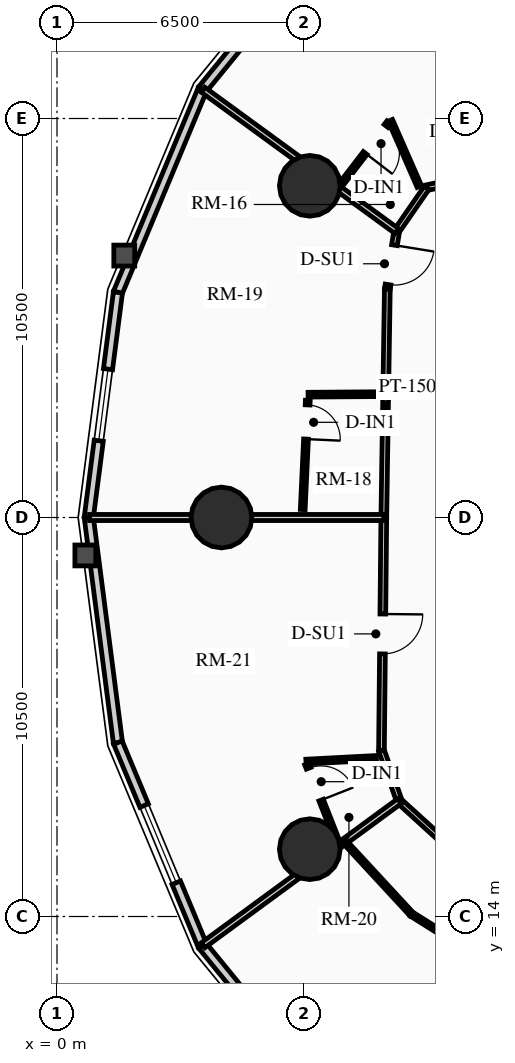
"""IFC4 building model, lengths in metres.
Left out: names, types, materials, properties, quantities, classifications, styles, units other than length and angle.
Written with IfcOpenShell. Run it as: python <this file> out.ifc"""

import sys

from ifc_helpers import new_model, si_unit, direction, frame, frame_2d, origin, origin_2d, place, context, subcontext, project, spatial, rectangle, circle, extrude, source, transform, mapped, element, fill, save


model = new_model("IFC4")
c1 = context("Model", 3, precision=1e-05, world=origin(), true_north=direction((0.0, 1.0)))
c2 = subcontext(c1, "Body", "Model", "MODEL_VIEW")
j1 = project(units=[si_unit("LENGTHUNIT", "METRE"), si_unit("PLANEANGLEUNIT", "RADIAN")], contexts=[c1])
p1 = place(None, origin())
s1 = spatial("IfcSite", under=j1, at=p1, CompositionType="ELEMENT")
p2 = place(p1, origin())
s2 = spatial("IfcBuilding", under=s1, at=p2, CompositionType="ELEMENT")
p3 = place(p2, frame((0.0, 0.0, 54.01)))
s3 = spatial("IfcBuildingStorey", under=s2, at=p3, CompositionType="ELEMENT", Elevation=54.01)
for number, where, z_axis, x_axis in (
    (1, (6.653, 33.229, 0.0), (0.0, 0.0, 1.0), (1.0, 0.0, 0.0)),
    (2, (4.328, 24.5, 0.0), (0.0, 0.0, 1.0), (1.0, 0.0, 0.0)),
    (3, (6.653, 15.771, 0.0), (0.0, 0.0, 1.0), (1.0, 0.0, 0.0)),
):
    element("IfcColumn", number, at=place(p3, frame(where, z_axis=z_axis, x_axis=x_axis)), inside=s3, PredefinedType="USERDEFINED", context=c2, shape_type="SweptSolid", body=[
        extrude(circle(Radius=0.8, at=origin_2d()), origin(), (0.0, 0.0, 1.0), 2.91),
    ])
p4 = place(p3, frame((3.828, 35.768, 0.0), z_axis=(0.0, 0.0, 1.0), x_axis=(0.632713287022, 0.77438614168, 0.0)))
e4 = element("IfcWall", 4, at=p4, inside=s3, PredefinedType="SOLIDWALL", context=c2, shape_type="SweptSolid", body=[
    extrude(rectangle(XDim=5.477, YDim=0.24, at=frame_2d((2.738, 0.0))), origin(), (0.0, 0.0, 1.0), 2.073),
])
m1 = source(origin(), c2, "Body", "SweptSolid", [
    extrude(rectangle(XDim=1.9, YDim=1.35, at=frame_2d((0.95, 0.675))), frame((0.0, 0.13, 0.0), z_axis=(0.0, -1.0, 0.0), x_axis=(1.0, 0.0, 0.0)), (0.0, 0.0, 1.0), 0.26),
])
p5 = place(p4, frame((1.788, 0.0, 0.65)))
e5 = element("IfcOpeningElement", 5, at=p5, cuts=e4, PredefinedType="OPENING", context=c2, shape_type="MappedRepresentation", body=[
    mapped(m1, transform((0.0, 0.0, 0.0), x_axis=(1.0, 0.0, 0.0), y_axis=(0.0, 1.0, 0.0), z_axis=(0.0, 0.0, 1.0), scale=1.0)),
])
p6 = place(p3, frame((1.604, 30.424, 0.0), z_axis=(0.0, 0.0, 1.0), x_axis=(0.384348836956, 0.923187939442, 0.0)))
e6 = element("IfcWall", 6, at=p6, inside=s3, PredefinedType="SOLIDWALL", context=c2, shape_type="SweptSolid", body=[
    extrude(rectangle(XDim=5.789, YDim=0.24, at=frame_2d((2.894, 0.0))), origin(), (0.0, 0.0, 1.0), 2.073),
])
p7 = place(p3, frame((0.837, 24.5, 0.0), z_axis=(0.0, 0.0, 1.0), x_axis=(0.128339641463, 0.991730274031, 0.0)))
e7 = element("IfcWall", 7, at=p7, inside=s3, PredefinedType="SOLIDWALL", context=c2, shape_type="SweptSolid", body=[
    extrude(rectangle(XDim=5.973, YDim=0.24, at=frame_2d((2.987, 0.0))), origin(), (0.0, 0.0, 1.0), 2.073),
])
p8 = place(p7, frame((2.037, 0.0, 0.65)))
e8 = element("IfcOpeningElement", 8, at=p8, cuts=e7, PredefinedType="OPENING", context=c2, shape_type="MappedRepresentation", body=[
    mapped(m1, transform((0.0, 0.0, 0.0), x_axis=(1.0, 0.0, 0.0), y_axis=(0.0, 1.0, 0.0), z_axis=(0.0, 0.0, 1.0), scale=1.0)),
])
p9 = place(p3, frame((1.604, 18.576, 0.0), z_axis=(0.0, 0.0, 1.0), x_axis=(-0.128339641463, 0.991730274031, 0.0)))
e9 = element("IfcWall", 9, at=p9, inside=s3, PredefinedType="SOLIDWALL", context=c2, shape_type="SweptSolid", body=[
    extrude(rectangle(XDim=5.973, YDim=0.24, at=frame_2d((2.987, 0.0))), origin(), (0.0, 0.0, 1.0), 2.073),
])
p10 = place(p3, frame((3.828, 13.232, 0.0), z_axis=(0.0, 0.0, 1.0), x_axis=(-0.384348836956, 0.923187939442, 0.0)))
e10 = element("IfcWall", 10, at=p10, inside=s3, PredefinedType="SOLIDWALL", context=c2, shape_type="SweptSolid", body=[
    extrude(rectangle(XDim=5.789, YDim=0.24, at=frame_2d((2.894, 0.0))), origin(), (0.0, 0.0, 1.0), 2.073),
])
m2 = source(origin(), c2, "Body", "SweptSolid", [
    extrude(rectangle(XDim=2.2, YDim=1.35, at=frame_2d((1.1, 0.675))), frame((0.0, 0.13, 0.0), z_axis=(0.0, -1.0, 0.0), x_axis=(1.0, 0.0, 0.0)), (0.0, 0.0, 1.0), 0.26),
])
p11 = place(p10, frame((1.794, 0.0, 0.65)))
e11 = element("IfcOpeningElement", 11, at=p11, cuts=e10, PredefinedType="OPENING", context=c2, shape_type="MappedRepresentation", body=[
    mapped(m2, transform((0.0, 0.0, 0.0), x_axis=(1.0, 0.0, 0.0), y_axis=(0.0, 1.0, 0.0), z_axis=(0.0, 0.0, 1.0), scale=1.0)),
])
p12 = place(p3, frame((7.293, 8.991, 0.0), z_axis=(0.0, 0.0, 1.0), x_axis=(-0.632713287022, 0.77438614168, 0.0)))
e12 = element("IfcWall", 12, at=p12, inside=s3, PredefinedType="SOLIDWALL", context=c2, shape_type="SweptSolid", body=[
    extrude(rectangle(XDim=5.477, YDim=0.24, at=frame_2d((2.738, 0.0))), origin(), (0.0, 0.0, 1.0), 2.073),
])
p13 = place(p3, frame((11.62, 33.588, 0.0), z_axis=(0.0, 0.0, 1.0), x_axis=(-0.977392314559, -0.211433827571, 0.0)))
e13 = element("IfcWall", 13, at=p13, inside=s3, PredefinedType="PARTITIONING", context=c2, shape_type="SweptSolid", body=[
    extrude(rectangle(XDim=1.934, YDim=0.15, at=frame_2d((0.967, 0.0))), origin(), (0.0, 0.0, 1.0), 2.159),
])
m3 = source(origin(), c2, "Body", "SweptSolid", [
    extrude(rectangle(XDim=1.05, YDim=2.015, at=frame_2d((0.525, 1.007))), frame((0.0, 0.085, 0.0), z_axis=(0.0, -1.0, 0.0), x_axis=(1.0, 0.0, 0.0)), (0.0, 0.0, 1.0), 0.17),
])
p14 = place(p13, frame((0.442, 0.0, 0.0)))
e14 = element("IfcOpeningElement", 14, at=p14, cuts=e13, PredefinedType="OPENING", context=c2, shape_type="MappedRepresentation", body=[
    mapped(m3, transform((0.0, 0.0, 0.0), x_axis=(1.0, 0.0, 0.0), y_axis=(0.0, 1.0, 0.0), z_axis=(0.0, 0.0, 1.0), scale=1.0)),
])
p15 = place(p3, frame((9.729, 33.179, 0.0), z_axis=(0.0, 0.0, 1.0), x_axis=(-0.569155068352, -0.822230203878, 0.0)))
e15 = element("IfcWall", 15, at=p15, inside=s3, PredefinedType="PARTITIONING", context=c2, shape_type="SweptSolid", body=[
    extrude(rectangle(XDim=1.387, YDim=0.15, at=frame_2d((0.694, 0.0))), origin(), (0.0, 0.0, 1.0), 2.159),
])
p16 = place(p3, frame((8.94, 32.038, 0.0), z_axis=(0.0, 0.0, 1.0), x_axis=(-0.159917336462, -0.987130409571, 0.0)))
e16 = element("IfcWall", 16, at=p16, inside=s3, PredefinedType="PARTITIONING", context=c2, shape_type="SweptSolid", body=[
    extrude(rectangle(XDim=1.547, YDim=0.15, at=frame_2d((0.773, 0.0))), origin(), (0.0, 0.0, 1.0), 2.205),
])
p17 = place(p16, frame((0.377, 0.0, 0.0)))
e17 = element("IfcOpeningElement", 17, at=p17, cuts=e16, PredefinedType="OPENING", context=c2, shape_type="MappedRepresentation", body=[
    mapped(m3, transform((0.0, 0.0, 0.0), x_axis=(1.0, 0.0, 0.0), y_axis=(0.0, 1.0, 0.0), z_axis=(0.0, 0.0, 1.0), scale=1.0)),
])
p18 = place(p3, frame((8.693, 30.512, 0.0), z_axis=(0.0, 0.0, 1.0), x_axis=(-0.015389665197, -0.99988157209, 0.0)))
e18 = element("IfcWall", 18, at=p18, inside=s3, PredefinedType="PARTITIONING", context=c2, shape_type="SweptSolid", body=[
    extrude(rectangle(XDim=6.012, YDim=0.15, at=frame_2d((3.006, 0.0))), origin(), (0.0, 0.0, 1.0), 2.635),
])
p19 = place(p3, frame((8.6, 24.5, 0.0), z_axis=(0.0, 0.0, 1.0), x_axis=(-0.010076760723, -0.999949228158, 0.0)))
e19 = element("IfcWall", 19, at=p19, inside=s3, PredefinedType="PARTITIONING", context=c2, shape_type="SweptSolid", body=[
    extrude(rectangle(XDim=6.13, YDim=0.15, at=frame_2d((3.065, 0.0))), origin(), (0.0, 0.0, 1.0), 2.159),
])
p20 = place(p19, frame((2.54, 0.0, 0.0)))
e20 = element("IfcOpeningElement", 20, at=p20, cuts=e19, PredefinedType="OPENING", context=c2, shape_type="MappedRepresentation", body=[
    mapped(m3, transform((0.0, 0.0, 0.0), x_axis=(1.0, 0.0, 0.0), y_axis=(0.0, 1.0, 0.0), z_axis=(0.0, 0.0, 1.0), scale=1.0)),
])
p21 = place(p3, frame((8.538, 18.371, 0.0), z_axis=(0.0, 0.0, 1.0), x_axis=(0.3330273821, -0.942917155837, 0.0)))
e21 = element("IfcWall", 21, at=p21, inside=s3, PredefinedType="PARTITIONING", context=c2, shape_type="SweptSolid", body=[
    extrude(rectangle(XDim=1.417, YDim=0.15, at=frame_2d((0.708, 0.0))), origin(), (0.0, 0.0, 1.0), 2.205),
])
p22 = place(p3, frame((9.01, 17.034, 0.0), z_axis=(0.0, 0.0, 1.0), x_axis=(0.739733009791, -0.672900493554, 0.0)))
e22 = element("IfcWall", 22, at=p22, inside=s3, PredefinedType="PARTITIONING", context=c2, shape_type="SweptSolid", body=[
    extrude(rectangle(XDim=1.494, YDim=0.15, at=frame_2d((0.747, 0.0))), origin(), (0.0, 0.0, 1.0), 2.159),
])
p23 = place(p3, frame((8.94, 32.038, 0.0), z_axis=(0.0, 0.0, 1.0), x_axis=(-0.807831293846, 0.58941377714, 0.0)))
e23 = element("IfcWall", 23, at=p23, inside=s3, PredefinedType="PARTITIONING", context=c2, shape_type="SweptSolid", body=[
    extrude(rectangle(XDim=6.308, YDim=0.16, at=frame_2d((3.154, 0.0))), origin(), (0.0, 0.0, 1.0), 2.073),
])
p24 = place(p3, frame((8.6, 24.5, 0.0), z_axis=(0.0, 0.0, 1.0), x_axis=(-1.0, 0.0, 0.0)))
e24 = element("IfcWall", 24, at=p24, inside=s3, PredefinedType="PARTITIONING", context=c2, shape_type="SweptSolid", body=[
    extrude(rectangle(XDim=7.743, YDim=0.16, at=frame_2d((3.872, 0.0))), origin(), (0.0, 0.0, 1.0), 2.073),
])
p25 = place(p3, frame((9.01, 17.034, 0.0), z_axis=(0.0, 0.0, 1.0), x_axis=(-0.806234156757, -0.591596555499, 0.0)))
e25 = element("IfcWall", 25, at=p25, inside=s3, PredefinedType="PARTITIONING", context=c2, shape_type="SweptSolid", body=[
    extrude(rectangle(XDim=6.407, YDim=0.16, at=frame_2d((3.204, 0.0))), origin(), (0.0, 0.0, 1.0), 2.073),
])
p26 = place(p3, frame((9.535, 33.211, 0.0), z_axis=(0.0, 0.0, 1.0), x_axis=(-0.401687955793, 0.915776602765, 0.0)))
e26 = element("IfcWall", 26, at=p26, inside=s3, PredefinedType="PARTITIONING", context=c2, shape_type="SweptSolid", body=[
    extrude(rectangle(XDim=1.901, YDim=0.125, at=frame_2d((0.95, 0.0))), origin(), (0.0, 0.0, 1.0), 2.635),
])
p27 = place(p3, frame((8.732, 34.899, 0.0), z_axis=(0.0, 0.0, 1.0), x_axis=(-0.609677010074, -0.792649950096, 0.0)))
e27 = element("IfcWall", 27, at=p27, inside=s3, PredefinedType="PARTITIONING", context=c2, shape_type="SweptSolid", body=[
    extrude(rectangle(XDim=2.097, YDim=0.125, at=frame_2d((1.049, 0.0))), origin(), (0.0, 0.0, 1.0), 2.073),
])
m4 = source(origin(), c2, "Body", "SweptSolid", [
    extrude(rectangle(XDim=0.9, YDim=2.005, at=frame_2d((0.45, 1.002))), frame((0.0, 0.073, 0.0), z_axis=(0.0, -1.0, 0.0), x_axis=(1.0, 0.0, 0.0)), (0.0, 0.0, 1.0), 0.145),
])
p28 = place(p27, frame((0.12, 0.0, 0.0)))
e28 = element("IfcOpeningElement", 28, at=p28, cuts=e27, PredefinedType="OPENING", context=c2, shape_type="MappedRepresentation", body=[
    mapped(m4, transform((0.0, 0.0, 0.0), x_axis=(1.0, 0.0, 0.0), y_axis=(0.0, 1.0, 0.0), z_axis=(0.0, 0.0, 1.0), scale=1.0)),
])
p29 = place(p3, frame((8.429, 27.745, 0.0), z_axis=(0.0, 0.0, 1.0), x_axis=(-0.999976632219, -0.006836301373, 0.0)))
e29 = element("IfcWall", 29, at=p29, inside=s3, PredefinedType="PARTITIONING", context=c2, shape_type="SweptSolid", body=[
    extrude(rectangle(XDim=1.821, YDim=0.125, at=frame_2d((0.911, 0.0))), origin(), (0.0, 0.0, 1.0), 2.635),
])
p30 = place(p3, frame((6.6, 27.583, 0.0), z_axis=(0.0, 0.0, 1.0), x_axis=(-0.046516553412, -0.998917519247, 0.0)))
e30 = element("IfcWall", 30, at=p30, inside=s3, PredefinedType="PARTITIONING", context=c2, shape_type="SweptSolid", body=[
    extrude(rectangle(XDim=2.876, YDim=0.125, at=frame_2d((1.438, 0.0))), origin(), (0.0, 0.0, 1.0), 2.635),
])
p31 = place(p30, frame((0.12, 0.0, 0.0)))
e31 = element("IfcOpeningElement", 31, at=p31, cuts=e30, PredefinedType="OPENING", context=c2, shape_type="MappedRepresentation", body=[
    mapped(m4, transform((0.0, 0.0, 0.0), x_axis=(1.0, 0.0, 0.0), y_axis=(0.0, 1.0, 0.0), z_axis=(0.0, 0.0, 1.0), scale=1.0)),
])
p32 = place(p3, frame((8.404, 18.173, 0.0), z_axis=(0.0, 0.0, 1.0), x_axis=(-0.998640999178, -0.052116741655, 0.0)))
e32 = element("IfcWall", 32, at=p32, inside=s3, PredefinedType="PARTITIONING", context=c2, shape_type="SweptSolid", body=[
    extrude(rectangle(XDim=1.855, YDim=0.125, at=frame_2d((0.927, 0.0))), origin(), (0.0, 0.0, 1.0), 2.205),
])
p33 = place(p3, frame((6.577, 18.012, 0.0), z_axis=(0.0, 0.0, 1.0), x_axis=(0.366179258149, -0.930544330433, 0.0)))
e33 = element("IfcWall", 33, at=p33, inside=s3, PredefinedType="PARTITIONING", context=c2, shape_type="SweptSolid", body=[
    extrude(rectangle(XDim=2.208, YDim=0.125, at=frame_2d((1.104, 0.0))), origin(), (0.0, 0.0, 1.0), 2.159),
])
p34 = place(p33, frame((0.12, 0.0, 0.0)))
e34 = element("IfcOpeningElement", 34, at=p34, cuts=e33, PredefinedType="OPENING", context=c2, shape_type="MappedRepresentation", body=[
    mapped(m4, transform((0.0, 0.0, 0.0), x_axis=(1.0, 0.0, 0.0), y_axis=(0.0, 1.0, 0.0), z_axis=(0.0, 0.0, 1.0), scale=1.0)),
])
p35 = place(p3, frame((7.564, 15.973, 0.0), z_axis=(0.0, 0.0, 1.0), x_axis=(0.678576389573, -0.734529838409, 0.0)))
e35 = element("IfcWall", 35, at=p35, inside=s3, PredefinedType="PARTITIONING", context=c2, shape_type="SweptSolid", body=[
    extrude(rectangle(XDim=2.601, YDim=0.125, at=frame_2d((1.3, 0.0))), origin(), (0.0, 0.0, 1.0), 2.635),
])
p36 = place(p3, frame((9.329, 14.063, 0.0), z_axis=(0.0, 0.0, 1.0), x_axis=(0.846882074778, -0.531780736225, 0.0)))
e36 = element("IfcWall", 36, at=p36, inside=s3, PredefinedType="PARTITIONING", context=c2, shape_type="SweptSolid", body=[
    extrude(rectangle(XDim=2.585, YDim=0.125, at=frame_2d((1.292, 0.0))), origin(), (0.0, 0.0, 1.0), 2.205),
])
m5 = source(origin(), c2, "Body", "SweptSolid", [
    extrude(rectangle(XDim=1.9, YDim=1.35, at=frame_2d((0.95, 0.675))), frame((0.0, 0.03, 0.0), z_axis=(0.0, -1.0, 0.0), x_axis=(1.0, 0.0, 0.0)), (0.0, 0.0, 1.0), 0.06),
])
p37 = place(p8, origin())
e37 = element("IfcWindow", 37, at=p37, inside=s3, PartitioningType="DOUBLE_PANEL_VERTICAL", PredefinedType="WINDOW", context=c2, shape_type="MappedRepresentation", body=[
    mapped(m5, transform((0.0, 0.0, 0.0), x_axis=(1.0, 0.0, 0.0), y_axis=(0.0, 1.0, 0.0), z_axis=(0.0, 0.0, 1.0), scale=1.0)),
])
fill(e8, e37)
m6 = source(origin(), c2, "Body", "SweptSolid", [
    extrude(rectangle(XDim=2.2, YDim=1.35, at=frame_2d((1.1, 0.675))), frame((0.0, 0.03, 0.0), z_axis=(0.0, -1.0, 0.0), x_axis=(1.0, 0.0, 0.0)), (0.0, 0.0, 1.0), 0.06),
])
p38 = place(p11, origin())
e38 = element("IfcWindow", 38, at=p38, inside=s3, PartitioningType="DOUBLE_PANEL_VERTICAL", PredefinedType="WINDOW", context=c2, shape_type="MappedRepresentation", body=[
    mapped(m6, transform((0.0, 0.0, 0.0), x_axis=(1.0, 0.0, 0.0), y_axis=(0.0, 1.0, 0.0), z_axis=(0.0, 0.0, 1.0), scale=1.0)),
])
fill(e11, e38)
m7 = source(origin(), c2, "Body", "SweptSolid", [
    extrude(rectangle(XDim=0.9, YDim=2.005, at=frame_2d((0.45, 1.002))), frame((0.0, 0.025, 0.0), z_axis=(0.0, -1.0, 0.0), x_axis=(1.0, 0.0, 0.0)), (0.0, 0.0, 1.0), 0.05),
])
p39 = place(p28, origin())
e39 = element("IfcDoor", 39, at=p39, inside=s3, OperationType="SINGLE_SWING_RIGHT", PredefinedType="DOOR", context=c2, shape_type="MappedRepresentation", body=[
    mapped(m7, transform((0.0, 0.0, 0.0), x_axis=(1.0, 0.0, 0.0), y_axis=(0.0, 1.0, 0.0), z_axis=(0.0, 0.0, 1.0), scale=1.0)),
])
fill(e28, e39)
m8 = source(origin(), c2, "Body", "SweptSolid", [
    extrude(rectangle(XDim=1.05, YDim=2.015, at=frame_2d((0.525, 1.007))), frame((0.0, 0.025, 0.0), z_axis=(0.0, -1.0, 0.0), x_axis=(1.0, 0.0, 0.0)), (0.0, 0.0, 1.0), 0.05),
])
p40 = place(p17, origin())
e40 = element("IfcDoor", 40, at=p40, inside=s3, OperationType="SINGLE_SWING_LEFT", PredefinedType="DOOR", context=c2, shape_type="MappedRepresentation", body=[
    mapped(m8, transform((0.0, 0.0, 0.0), x_axis=(1.0, 0.0, 0.0), y_axis=(0.0, 1.0, 0.0), z_axis=(0.0, 0.0, 1.0), scale=1.0)),
])
fill(e17, e40)
p41 = place(p31, origin())
e41 = element("IfcDoor", 41, at=p41, inside=s3, OperationType="SINGLE_SWING_RIGHT", PredefinedType="DOOR", context=c2, shape_type="MappedRepresentation", body=[
    mapped(m7, transform((0.0, 0.0, 0.0), x_axis=(1.0, 0.0, 0.0), y_axis=(0.0, 1.0, 0.0), z_axis=(0.0, 0.0, 1.0), scale=1.0)),
])
fill(e31, e41)
p42 = place(p20, origin())
e42 = element("IfcDoor", 42, at=p42, inside=s3, OperationType="SINGLE_SWING_LEFT", PredefinedType="DOOR", context=c2, shape_type="MappedRepresentation", body=[
    mapped(m8, transform((0.0, 0.0, 0.0), x_axis=(1.0, 0.0, 0.0), y_axis=(0.0, 1.0, 0.0), z_axis=(0.0, 0.0, 1.0), scale=1.0)),
])
fill(e20, e42)
p43 = place(p34, origin())
e43 = element("IfcDoor", 43, at=p43, inside=s3, OperationType="SINGLE_SWING_RIGHT", PredefinedType="DOOR", context=c2, shape_type="MappedRepresentation", body=[
    mapped(m7, transform((0.0, 0.0, 0.0), x_axis=(1.0, 0.0, 0.0), y_axis=(0.0, 1.0, 0.0), z_axis=(0.0, 0.0, 1.0), scale=1.0)),
])
fill(e34, e43)
save(model, sys.argv[1])
